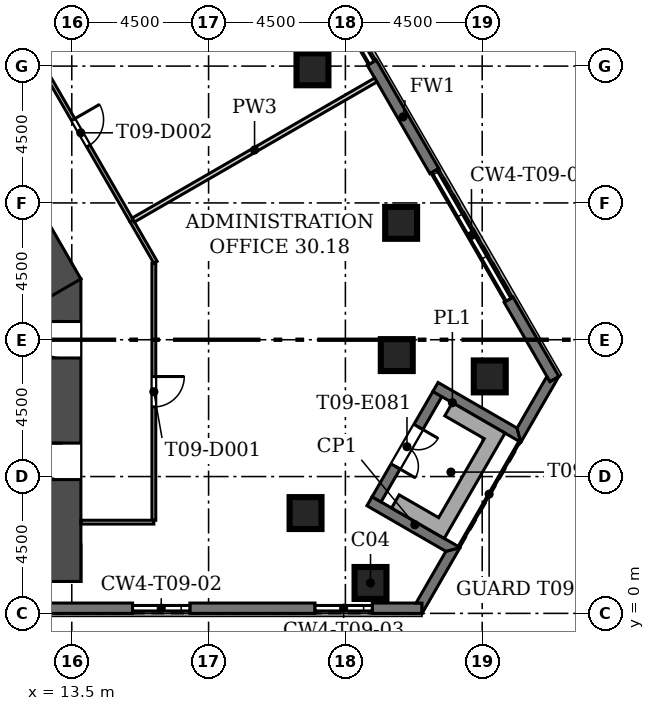
"""IFC4 building model, lengths in metres.
Left out: names, types, materials, properties, quantities, classifications, styles, units other than length and angle.
Written with IfcOpenShell. Run it as: python <this file> out.ifc"""

import sys

from ifc_helpers import new_model, si_unit, direction, frame, frame_2d, origin, origin_2d, place, context, subcontext, project, spatial, polyline, rectangle, outline, extrude, element, fill, save


model = new_model("IFC4")
c1 = context("Model", 3, precision=1e-05, world=origin(), true_north=direction((0.0, 1.0)))
c2 = subcontext(c1, "Body", "Model", "MODEL_VIEW")
j1 = project(units=[si_unit("LENGTHUNIT", "METRE"), si_unit("PLANEANGLEUNIT", "RADIAN")], contexts=[c1])
p1 = place(None, origin())
s1 = spatial("IfcSite", under=j1, at=p1, CompositionType="ELEMENT")
p2 = place(p1, origin())
s2 = spatial("IfcBuilding", under=s1, at=p2, CompositionType="ELEMENT")
p3 = place(p2, frame((0.0, 0.0, 137.5)))
s3 = spatial("IfcBuildingStorey", under=s2, at=p3, CompositionType="ELEMENT", Elevation=137.5)
for number, where, z_axis, x_axis in (
    (1, (23.326, 1.0, 0.0), (0.0, 0.0, 1.0), (1.0, 0.0, 0.0)),
    (2, (21.19, 3.299, 0.0), (0.0, 0.0, 1.0), (1.0, 0.0, 0.0)),
    (3, (24.19, 8.495, 0.0), (0.0, 0.0, 1.0), (1.0, 0.0, 0.0)),
    (4, (27.249, 7.794, 0.0), (0.0, 0.0, 1.0), (1.0, 0.0, 0.0)),
    (5, (24.333, 12.844, 0.0), (0.0, 0.0, 1.0), (1.0, 0.0, 0.0)),
    (6, (21.417, 17.895, 0.0), (0.0, 0.0, 1.0), (1.0, 0.0, 0.0)),
):
    element("IfcColumn", number, at=place(p3, frame(where, z_axis=z_axis, x_axis=x_axis)), inside=s3, PredefinedType="COLUMN", context=c2, shape_type="SweptSolid", body=[
        extrude(rectangle(XDim=1.05, YDim=1.05, at=origin_2d()), origin(), (0.0, 0.0, 1.0), 5.4),
    ])
p4 = place(p3, frame((-13.8, 1.65, 0.0), z_axis=(0.0, 0.0, 1.0), x_axis=(1.0, 0.0, 0.0)))
e7 = element("IfcWall", 7, at=p4, inside=s3, PredefinedType="SHEAR", context=c2, shape_type="SweptSolid", body=[
    extrude(rectangle(XDim=27.6, YDim=1.2, at=frame_2d((13.8, 0.0))), origin(), (0.0, 0.0, 1.0), 5.4),
])
p5 = place(p3, frame((13.2, 1.05, 0.0), z_axis=(0.0, 0.0, 1.0), x_axis=(0.0, 1.0, 0.0)))
e8 = element("IfcWall", 8, at=p5, inside=s3, PredefinedType="SHEAR", context=c2, shape_type="SweptSolid", body=[
    extrude(rectangle(XDim=9.949, YDim=1.2, at=frame_2d((4.975, 0.0))), origin(), (0.0, 0.0, 1.0), 5.4),
])
p6 = place(p5, frame((3.35, 0.0, 0.0)))
e9 = element("IfcOpeningElement", 9, at=p6, cuts=e8, PredefinedType="OPENING", context=c2, shape_type="SweptSolid", body=[
    extrude(rectangle(XDim=1.2, YDim=2.1, at=frame_2d((0.6, 1.05))), frame((0.0, 0.61, 0.0), z_axis=(0.0, -1.0, 0.0), x_axis=(1.0, 0.0, 0.0)), (0.0, 0.0, 1.0), 1.22),
])
p7 = place(p5, frame((7.35, 0.0, 0.0)))
e10 = element("IfcOpeningElement", 10, at=p7, cuts=e8, PredefinedType="OPENING", context=c2, shape_type="SweptSolid", body=[
    extrude(rectangle(XDim=1.2, YDim=2.1, at=frame_2d((0.6, 1.05))), frame((0.0, 0.61, 0.0), z_axis=(0.0, -1.0, 0.0), x_axis=(1.0, 0.0, 0.0)), (0.0, 0.0, 1.0), 1.22),
])
p8 = place(p3, frame((13.281, 10.699, 0.0), z_axis=(0.0, 0.0, 1.0), x_axis=(-0.499998513025, 0.866026262288, 0.0)))
e11 = element("IfcWall", 11, at=p8, inside=s3, PredefinedType="SHEAR", context=c2, shape_type="SweptSolid", body=[
    extrude(rectangle(XDim=9.008, YDim=1.2, at=frame_2d((4.504, 0.0))), origin(), (0.0, 0.0, 1.0), 5.4),
])
p9 = place(p3, frame((-18.615, 0.17, 0.0), z_axis=(0.0, 0.0, 1.0), x_axis=(1.0, 0.0, 0.0)))
e12 = element("IfcWall", 12, at=p9, inside=s3, PredefinedType="SOLIDWALL", context=c2, shape_type="SweptSolid", body=[
    extrude(rectangle(XDim=34.115, YDim=0.34, at=frame_2d((17.058, 0.0))), origin(), (0.0, 0.0, 1.0), 5.0),
])
p10 = place(p3, frame((17.385, 0.17, 0.0), z_axis=(0.0, 0.0, 1.0), x_axis=(1.0, 0.0, 0.0)))
e13 = element("IfcWall", 13, at=p10, inside=s3, PredefinedType="SOLIDWALL", context=c2, shape_type="SweptSolid", body=[
    extrude(rectangle(XDim=4.115, YDim=0.34, at=frame_2d((2.058, 0.0))), origin(), (0.0, 0.0, 1.0), 5.0),
])
p11 = place(p3, frame((23.385, 0.17, 0.0), z_axis=(0.0, 0.0, 1.0), x_axis=(1.0, 0.0, 0.0)))
e14 = element("IfcWall", 14, at=p11, inside=s3, PredefinedType="SOLIDWALL", context=c2, shape_type="SweptSolid", body=[
    extrude(rectangle(XDim=1.636, YDim=0.34, at=frame_2d((0.818, 0.0))), origin(), (0.0, 0.0, 1.0), 5.0),
])
p12 = place(p3, origin())
e15 = element("IfcWall", 15, at=p12, inside=s3, PredefinedType="SOLIDWALL", context=c2, shape_type="SweptSolid", body=[
    extrude(outline(polyline([(26.272, 2.166), (25.021, -0.001), (25.02, -0.001), (25.02, 0.339), (24.823, 0.339), (25.806, 2.041), (26.272, 2.166), (26.272, 2.166)])), origin(), (0.0, 0.0, 1.0), 5.0),
])
p13 = place(p3, origin())
e16 = element("IfcWall", 16, at=p13, inside=s3, PredefinedType="SOLIDWALL", context=c2, shape_type="SweptSolid", body=[
    extrude(outline(polyline([(23.208, 3.54), (23.378, 3.836), (23.673, 3.666), (26.272, 2.165), (26.272, 2.165), (25.806, 2.04), (23.208, 3.54)])), origin(), (0.0, 0.0, 1.0), 5.0),
])
p14 = place(p3, frame((23.526, 3.75, 0.0), z_axis=(0.0, 0.0, 1.0), x_axis=(0.49999894854, 0.866026010844, 0.0)))
e17 = element("IfcWall", 17, at=p14, inside=s3, PredefinedType="SOLIDWALL", context=c2, shape_type="SweptSolid", body=[
    extrude(rectangle(XDim=4.0, YDim=0.34, at=frame_2d((2.0, 0.0))), origin(), (0.0, 0.0, 1.0), 5.0),
])
p15 = place(p14, frame((1.25, 0.0, 0.0)))
e18 = element("IfcOpeningElement", 18, at=p15, cuts=e17, PredefinedType="OPENING", context=c2, shape_type="SweptSolid", body=[
    extrude(rectangle(XDim=1.5, YDim=2.4, at=frame_2d((0.75, 1.2))), frame((0.0, 0.18, 0.0), z_axis=(0.0, -1.0, 0.0), x_axis=(1.0, 0.0, 0.0)), (0.0, 0.0, 1.0), 0.36),
])
p16 = place(p3, origin())
e19 = element("IfcWall", 19, at=p16, inside=s3, PredefinedType="SOLIDWALL", context=c2, shape_type="SweptSolid", body=[
    extrude(outline(polyline([(28.271, 5.628), (25.673, 7.129), (25.377, 7.299), (25.548, 7.594), (28.147, 6.094), (28.272, 5.628), (28.271, 5.628)])), origin(), (0.0, 0.0, 1.0), 5.0),
])
p17 = place(p3, origin())
e20 = element("IfcWall", 20, at=p17, inside=s3, PredefinedType="SOLIDWALL", context=c2, shape_type="SweptSolid", body=[
    extrude(outline(polyline([(29.128, 7.795), (29.227, 7.625), (29.521, 7.795), (29.522, 7.795), (28.271, 5.628), (28.271, 5.628), (28.146, 6.094), (29.128, 7.795)])), origin(), (0.0, 0.0, 1.0), 5.0),
])
p18 = place(p3, frame((29.374, 7.709, 0.0), z_axis=(0.0, 0.0, 1.0), x_axis=(-0.499968157123, 0.866043787497, 0.0)))
e21 = element("IfcWall", 21, at=p18, inside=s3, PredefinedType="SOLIDWALL", context=c2, shape_type="SweptSolid", body=[
    extrude(rectangle(XDim=3.01, YDim=0.34, at=frame_2d((1.505, 0.0))), origin(), (0.0, 0.0, 1.0), 5.0),
])
p19 = place(p3, frame((25.426, 14.547, 0.0), z_axis=(0.0, 0.0, 1.0), x_axis=(-0.500018604663, 0.866014662111, 0.0)))
e22 = element("IfcWall", 22, at=p19, inside=s3, PredefinedType="SOLIDWALL", context=c2, shape_type="SweptSolid", body=[
    extrude(rectangle(XDim=4.115, YDim=0.34, at=frame_2d((2.058, 0.0))), origin(), (0.0, 0.0, 1.0), 5.0),
])
p20 = place(p3, origin())
e23 = element("IfcWall", 23, at=p20, inside=s3, PredefinedType="USERDEFINED", context=c2, shape_type="SweptSolid", body=[
    extrude(outline(polyline([(24.019, 3.465), (25.318, 2.715), (25.318, 2.715), (25.751, 2.465), (27.501, 5.496), (27.751, 5.929), (26.019, 6.929), (25.769, 6.496), (27.068, 5.746), (25.568, 3.148), (24.269, 3.898), (24.019, 3.465)])), origin(), (0.0, 0.0, 1.0), 1.1),
])
p21 = place(p3, frame((15.47, 12.906, 0.0), z_axis=(0.0, 0.0, 1.0), x_axis=(0.500072733165, -0.865983407199, 0.0)))
e24 = element("IfcWall", 24, at=p21, inside=s3, PredefinedType="PARTITIONING", context=c2, shape_type="SweptSolid", body=[
    extrude(rectangle(XDim=1.569, YDim=0.125, at=frame_2d((0.784, 0.0))), origin(), (0.0, 0.0, 1.0), 5.0),
])
p22 = place(p3, frame((16.2, 11.517, 0.0), z_axis=(0.0, 0.0, 1.0), x_axis=(0.0, -1.0, 0.0)))
e25 = element("IfcWall", 25, at=p22, inside=s3, PredefinedType="PARTITIONING", context=c2, shape_type="SweptSolid", body=[
    extrude(rectangle(XDim=8.455, YDim=0.125, at=frame_2d((4.227, 0.0))), origin(), (0.0, 0.0, 1.0), 5.0),
])
p23 = place(p22, frame((3.727, 0.0, 0.0)))
e26 = element("IfcOpeningElement", 26, at=p23, cuts=e25, PredefinedType="OPENING", context=c2, shape_type="SweptSolid", body=[
    extrude(rectangle(XDim=1.0, YDim=2.1, at=frame_2d((0.5, 1.05))), frame((0.0, 0.073, 0.0), z_axis=(0.0, -1.0, 0.0), x_axis=(1.0, 0.0, 0.0)), (0.0, 0.0, 1.0), 0.145),
])
p24 = place(p3, frame((16.2, 3.0, 0.0), z_axis=(0.0, 0.0, 1.0), x_axis=(-1.0, 0.0, 0.0)))
e27 = element("IfcWall", 27, at=p24, inside=s3, PredefinedType="PARTITIONING", context=c2, shape_type="SweptSolid", body=[
    extrude(rectangle(XDim=2.4, YDim=0.125, at=frame_2d((1.2, 0.0))), origin(), (0.0, 0.0, 1.0), 5.0),
])
p25 = place(p3, frame((12.122, 18.706, 0.0), z_axis=(0.0, 0.0, 1.0), x_axis=(0.499989655977, -0.866031375826, 0.0)))
e28 = element("IfcWall", 28, at=p25, inside=s3, PredefinedType="PARTITIONING", context=c2, shape_type="SweptSolid", body=[
    extrude(rectangle(XDim=6.697, YDim=0.125, at=frame_2d((3.348, 0.0))), origin(), (0.0, 0.0, 1.0), 5.0),
])
p26 = place(p25, frame((2.848, 0.0, 0.0)))
e29 = element("IfcOpeningElement", 29, at=p26, cuts=e28, PredefinedType="OPENING", context=c2, shape_type="SweptSolid", body=[
    extrude(rectangle(XDim=1.0, YDim=2.1, at=frame_2d((0.5, 1.05))), frame((0.0, 0.073, 0.0), z_axis=(0.0, -1.0, 0.0), x_axis=(1.0, 0.0, 0.0)), (0.0, 0.0, 1.0), 0.145),
])
p27 = place(p3, frame((15.524, 12.938, 0.0), z_axis=(0.0, 0.0, 1.0), x_axis=(0.866037264291, 0.499979456437, 0.0)))
e30 = element("IfcWall", 30, at=p27, inside=s3, PredefinedType="PARTITIONING", context=c2, shape_type="SweptSolid", body=[
    extrude(rectangle(XDim=9.21, YDim=0.15, at=frame_2d((4.605, 0.0))), origin(), (0.0, 0.0, 1.0), 5.0),
])
p28 = place(p15, frame((1.5, 0.0, 0.0), z_axis=(0.0, 0.0, 1.0), x_axis=(-1.0, 0.0, 0.0)))
e31 = element("IfcDoor", 31, at=p28, inside=s3, OperationType="DOUBLE_DOOR_SINGLE_SWING", PredefinedType="DOOR", context=c2, shape_type="SweptSolid", body=[
    extrude(rectangle(XDim=1.5, YDim=2.4, at=frame_2d((0.75, 1.2))), frame((0.0, 0.025, 0.0), z_axis=(0.0, -1.0, 0.0), x_axis=(1.0, 0.0, 0.0)), (0.0, 0.0, 1.0), 0.05),
])
fill(e18, e31)
p29 = place(p6, origin())
e32 = element("IfcDoor", 32, at=p29, inside=s3, OperationType="SINGLE_SWING_RIGHT", PredefinedType="DOOR", context=c2, shape_type="SweptSolid", body=[
    extrude(rectangle(XDim=1.2, YDim=2.1, at=frame_2d((0.6, 1.05))), frame((0.0, 0.025, 0.0), z_axis=(0.0, -1.0, 0.0), x_axis=(1.0, 0.0, 0.0)), (0.0, 0.0, 1.0), 0.05),
])
fill(e9, e32)
p30 = place(p7, origin())
e33 = element("IfcDoor", 33, at=p30, inside=s3, OperationType="SINGLE_SWING_RIGHT", PredefinedType="DOOR", context=c2, shape_type="SweptSolid", body=[
    extrude(rectangle(XDim=1.2, YDim=2.1, at=frame_2d((0.6, 1.05))), frame((0.0, 0.025, 0.0), z_axis=(0.0, -1.0, 0.0), x_axis=(1.0, 0.0, 0.0)), (0.0, 0.0, 1.0), 0.05),
])
fill(e10, e33)
p31 = place(p23, origin())
e34 = element("IfcDoor", 34, at=p31, inside=s3, OperationType="SINGLE_SWING_LEFT", PredefinedType="DOOR", context=c2, shape_type="SweptSolid", body=[
    extrude(rectangle(XDim=1.0, YDim=2.1, at=frame_2d((0.5, 1.05))), frame((0.0, 0.025, 0.0), z_axis=(0.0, -1.0, 0.0), x_axis=(1.0, 0.0, 0.0)), (0.0, 0.0, 1.0), 0.05),
])
fill(e26, e34)
p32 = place(p26, origin())
e35 = element("IfcDoor", 35, at=p32, inside=s3, OperationType="SINGLE_SWING_LEFT", PredefinedType="DOOR", context=c2, shape_type="SweptSolid", body=[
    extrude(rectangle(XDim=1.0, YDim=2.1, at=frame_2d((0.5, 1.05))), frame((0.0, 0.025, 0.0), z_axis=(0.0, -1.0, 0.0), x_axis=(1.0, 0.0, 0.0)), (0.0, 0.0, 1.0), 0.05),
])
fill(e29, e35)
save(model, sys.argv[1])
